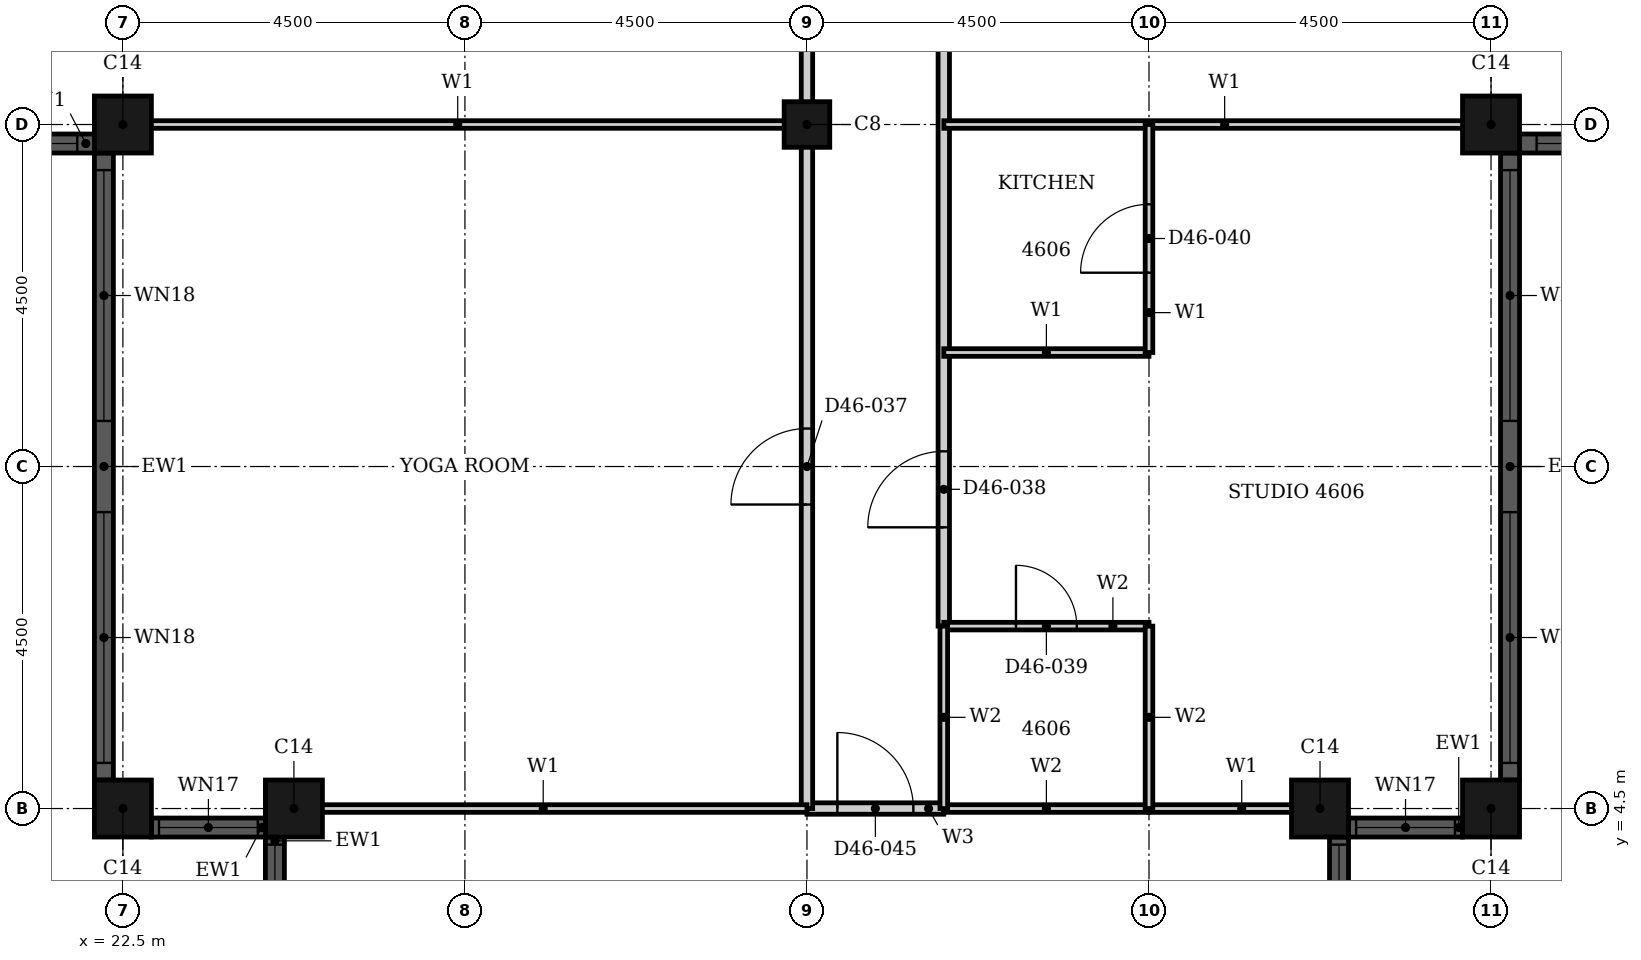
"""IFC4 building model, lengths in metres.
Left out: names, types, materials, properties, quantities, classifications, styles, units other than length and angle.
Written with IfcOpenShell. Run it as: python <this file> out.ifc"""

import sys

from ifc_helpers import new_model, si_unit, direction, frame, frame_2d, origin, origin_2d, place, context, subcontext, project, spatial, rectangle, hollow_rectangle, extrude, element, fill, save


model = new_model("IFC4")
c1 = context("Model", 3, precision=1e-05, world=origin(), true_north=direction((0.0, 1.0)))
c2 = subcontext(c1, "Body", "Model", "MODEL_VIEW")
j1 = project(units=[si_unit("LENGTHUNIT", "METRE"), si_unit("PLANEANGLEUNIT", "RADIAN")], contexts=[c1])
p1 = place(None, origin())
s1 = spatial("IfcSite", under=j1, at=p1, CompositionType="ELEMENT")
p2 = place(p1, origin())
s2 = spatial("IfcBuilding", under=s1, at=p2, CompositionType="ELEMENT")
p3 = place(p2, frame((0.0, 0.0, 183.9)))
s3 = spatial("IfcBuildingStorey", under=s2, at=p3, CompositionType="ELEMENT", Elevation=183.9)
for number, where, z_axis, x_axis in (
    (1, (22.5, 4.5, 0.0), (0.0, 0.0, 1.0), (1.0, 0.0, 0.0)),
    (2, (24.75, 4.5, 0.0), (0.0, 0.0, 1.0), (1.0, 0.0, 0.0)),
    (3, (38.25, 4.5, 0.0), (0.0, 0.0, 1.0), (1.0, 0.0, 0.0)),
    (4, (40.5, 4.5, 0.0), (0.0, 0.0, 1.0), (1.0, 0.0, 0.0)),
    (5, (40.5, 13.5, 0.0), (0.0, 0.0, 1.0), (1.0, 0.0, 0.0)),
    (6, (22.5, 13.5, 0.0), (0.0, 0.0, 1.0), (1.0, 0.0, 0.0)),
):
    element("IfcColumn", number, at=place(p3, frame(where, z_axis=z_axis, x_axis=x_axis)), inside=s3, PredefinedType="COLUMN", context=c2, shape_type="SweptSolid", body=[
        extrude(hollow_rectangle(XDim=0.75, YDim=0.75, WallThickness=0.024, at=origin_2d()), origin(), (0.0, 0.0, 1.0), 3.7),
    ])
p4 = place(p3, frame((31.5, 13.5, 0.0), z_axis=(0.0, 0.0, 1.0), x_axis=(1.0, 0.0, 0.0)))
e7 = element("IfcColumn", 7, at=p4, inside=s3, PredefinedType="COLUMN", context=c2, shape_type="SweptSolid", body=[
    extrude(hollow_rectangle(XDim=0.6, YDim=0.6, WallThickness=0.02, at=origin_2d()), origin(), (0.0, 0.0, 1.0), 3.7),
])
p5 = place(p3, frame((22.875, 4.25, 0.0), z_axis=(0.0, 0.0, 1.0), x_axis=(1.0, 0.0, 0.0)))
e8 = element("IfcWall", 8, at=p5, inside=s3, PredefinedType="SOLIDWALL", context=c2, shape_type="SweptSolid", body=[
    extrude(rectangle(XDim=1.5, YDim=0.25, at=frame_2d((0.75, 0.0))), origin(), (0.0, 0.0, 1.0), 3.7),
])
p6 = place(p5, frame((0.1, 0.0, 0.9)))
e9 = element("IfcOpeningElement", 9, at=p6, cuts=e8, PredefinedType="OPENING", context=c2, shape_type="SweptSolid", body=[
    extrude(rectangle(XDim=1.3, YDim=1.95, at=frame_2d((0.65, 0.975))), frame((0.0, 0.135, 0.0), z_axis=(0.0, -1.0, 0.0), x_axis=(1.0, 0.0, 0.0)), (0.0, 0.0, 1.0), 0.27),
])
p7 = place(p3, frame((24.5, 4.125, 0.0), z_axis=(0.0, 0.0, 1.0), x_axis=(0.0, -1.0, 0.0)))
e10 = element("IfcWall", 10, at=p7, inside=s3, PredefinedType="SOLIDWALL", context=c2, shape_type="SweptSolid", body=[
    extrude(rectangle(XDim=1.5, YDim=0.25, at=frame_2d((0.75, 0.0))), origin(), (0.0, 0.0, 1.0), 3.7),
])
p8 = place(p7, frame((0.1, 0.0, 0.9)))
e11 = element("IfcOpeningElement", 11, at=p8, cuts=e10, PredefinedType="OPENING", context=c2, shape_type="SweptSolid", body=[
    extrude(rectangle(XDim=1.3, YDim=1.95, at=frame_2d((0.65, 0.975))), frame((0.0, 0.135, 0.0), z_axis=(0.0, -1.0, 0.0), x_axis=(1.0, 0.0, 0.0)), (0.0, 0.0, 1.0), 0.27),
])
p9 = place(p3, frame((38.5, 2.625, 0.0), z_axis=(0.0, 0.0, 1.0), x_axis=(0.0, 1.0, 0.0)))
e12 = element("IfcWall", 12, at=p9, inside=s3, PredefinedType="SOLIDWALL", context=c2, shape_type="SweptSolid", body=[
    extrude(rectangle(XDim=1.5, YDim=0.25, at=frame_2d((0.75, 0.0))), origin(), (0.0, 0.0, 1.0), 3.7),
])
p10 = place(p9, frame((0.1, 0.0, 0.9)))
e13 = element("IfcOpeningElement", 13, at=p10, cuts=e12, PredefinedType="OPENING", context=c2, shape_type="SweptSolid", body=[
    extrude(rectangle(XDim=1.3, YDim=1.95, at=frame_2d((0.65, 0.975))), frame((0.0, 0.135, 0.0), z_axis=(0.0, -1.0, 0.0), x_axis=(1.0, 0.0, 0.0)), (0.0, 0.0, 1.0), 0.27),
])
p11 = place(p3, frame((38.625, 4.25, 0.0), z_axis=(0.0, 0.0, 1.0), x_axis=(1.0, 0.0, 0.0)))
e14 = element("IfcWall", 14, at=p11, inside=s3, PredefinedType="SOLIDWALL", context=c2, shape_type="SweptSolid", body=[
    extrude(rectangle(XDim=1.5, YDim=0.25, at=frame_2d((0.75, 0.0))), origin(), (0.0, 0.0, 1.0), 3.7),
])
p12 = place(p11, frame((0.1, 0.0, 0.9)))
e15 = element("IfcOpeningElement", 15, at=p12, cuts=e14, PredefinedType="OPENING", context=c2, shape_type="SweptSolid", body=[
    extrude(rectangle(XDim=1.3, YDim=1.95, at=frame_2d((0.65, 0.975))), frame((0.0, 0.135, 0.0), z_axis=(0.0, -1.0, 0.0), x_axis=(1.0, 0.0, 0.0)), (0.0, 0.0, 1.0), 0.27),
])
p13 = place(p3, frame((40.75, 4.875, 0.0), z_axis=(0.0, 0.0, 1.0), x_axis=(0.0, 1.0, 0.0)))
e16 = element("IfcWall", 16, at=p13, inside=s3, PredefinedType="SOLIDWALL", context=c2, shape_type="SweptSolid", body=[
    extrude(rectangle(XDim=8.25, YDim=0.25, at=frame_2d((4.125, 0.0))), origin(), (0.0, 0.0, 1.0), 3.7),
])
p14 = place(p13, frame((0.225, 0.0, 0.45)))
e17 = element("IfcOpeningElement", 17, at=p14, cuts=e16, PredefinedType="OPENING", context=c2, shape_type="SweptSolid", body=[
    extrude(rectangle(XDim=3.3, YDim=2.4, at=frame_2d((1.65, 1.2))), frame((0.0, 0.135, 0.0), z_axis=(0.0, -1.0, 0.0), x_axis=(1.0, 0.0, 0.0)), (0.0, 0.0, 1.0), 0.27),
])
p15 = place(p13, frame((4.725, 0.0, 0.45)))
e18 = element("IfcOpeningElement", 18, at=p15, cuts=e16, PredefinedType="OPENING", context=c2, shape_type="SweptSolid", body=[
    extrude(rectangle(XDim=3.3, YDim=2.4, at=frame_2d((1.65, 1.2))), frame((0.0, 0.135, 0.0), z_axis=(0.0, -1.0, 0.0), x_axis=(1.0, 0.0, 0.0)), (0.0, 0.0, 1.0), 0.27),
])
p16 = place(p3, frame((40.875, 13.25, 0.0), z_axis=(0.0, 0.0, 1.0), x_axis=(1.0, 0.0, 0.0)))
e19 = element("IfcWall", 19, at=p16, inside=s3, PredefinedType="SOLIDWALL", context=c2, shape_type="SweptSolid", body=[
    extrude(rectangle(XDim=3.75, YDim=0.25, at=frame_2d((1.875, 0.0))), origin(), (0.0, 0.0, 1.0), 3.7),
])
p17 = place(p16, frame((0.225, 0.0, 0.45)))
e20 = element("IfcOpeningElement", 20, at=p17, cuts=e19, PredefinedType="OPENING", context=c2, shape_type="SweptSolid", body=[
    extrude(rectangle(XDim=3.3, YDim=2.4, at=frame_2d((1.65, 1.2))), frame((0.0, 0.135, 0.0), z_axis=(0.0, -1.0, 0.0), x_axis=(1.0, 0.0, 0.0)), (0.0, 0.0, 1.0), 0.27),
])
p18 = place(p3, frame((18.375, 13.25, 0.0), z_axis=(0.0, 0.0, 1.0), x_axis=(1.0, 0.0, 0.0)))
e21 = element("IfcWall", 21, at=p18, inside=s3, PredefinedType="SOLIDWALL", context=c2, shape_type="SweptSolid", body=[
    extrude(rectangle(XDim=3.75, YDim=0.25, at=frame_2d((1.875, 0.0))), origin(), (0.0, 0.0, 1.0), 3.7),
])
p19 = place(p18, frame((0.225, 0.0, 0.45)))
e22 = element("IfcOpeningElement", 22, at=p19, cuts=e21, PredefinedType="OPENING", context=c2, shape_type="SweptSolid", body=[
    extrude(rectangle(XDim=3.3, YDim=2.4, at=frame_2d((1.65, 1.2))), frame((0.0, 0.135, 0.0), z_axis=(0.0, -1.0, 0.0), x_axis=(1.0, 0.0, 0.0)), (0.0, 0.0, 1.0), 0.27),
])
p20 = place(p3, frame((22.25, 13.125, 0.0), z_axis=(0.0, 0.0, 1.0), x_axis=(0.0, -1.0, 0.0)))
e23 = element("IfcWall", 23, at=p20, inside=s3, PredefinedType="SOLIDWALL", context=c2, shape_type="SweptSolid", body=[
    extrude(rectangle(XDim=8.25, YDim=0.25, at=frame_2d((4.125, 0.0))), origin(), (0.0, 0.0, 1.0), 3.7),
])
p21 = place(p20, frame((0.225, 0.0, 0.45)))
e24 = element("IfcOpeningElement", 24, at=p21, cuts=e23, PredefinedType="OPENING", context=c2, shape_type="SweptSolid", body=[
    extrude(rectangle(XDim=3.3, YDim=2.4, at=frame_2d((1.65, 1.2))), frame((0.0, 0.135, 0.0), z_axis=(0.0, -1.0, 0.0), x_axis=(1.0, 0.0, 0.0)), (0.0, 0.0, 1.0), 0.27),
])
p22 = place(p20, frame((4.725, 0.0, 0.45)))
e25 = element("IfcOpeningElement", 25, at=p22, cuts=e23, PredefinedType="OPENING", context=c2, shape_type="SweptSolid", body=[
    extrude(rectangle(XDim=3.3, YDim=2.4, at=frame_2d((1.65, 1.2))), frame((0.0, 0.135, 0.0), z_axis=(0.0, -1.0, 0.0), x_axis=(1.0, 0.0, 0.0)), (0.0, 0.0, 1.0), 0.27),
])
p23 = place(p3, frame((31.5, 4.5, 0.0), z_axis=(0.0, 0.0, 1.0), x_axis=(1.0, 0.0, 0.0)))
e26 = element("IfcWall", 26, at=p23, inside=s3, PredefinedType="PARTITIONING", context=c2, shape_type="SweptSolid", body=[
    extrude(rectangle(XDim=1.8, YDim=0.15, at=frame_2d((0.9, 0.0))), origin(), (0.0, 0.0, 1.0), 3.3),
])
p24 = place(p23, frame((0.4, 0.0, 0.0)))
e27 = element("IfcOpeningElement", 27, at=p24, cuts=e26, PredefinedType="OPENING", context=c2, shape_type="SweptSolid", body=[
    extrude(rectangle(XDim=1.0, YDim=2.1, at=frame_2d((0.5, 1.05))), frame((0.0, 0.085, 0.0), z_axis=(0.0, -1.0, 0.0), x_axis=(1.0, 0.0, 0.0)), (0.0, 0.0, 1.0), 0.17),
])
p25 = place(p3, frame((31.5, 4.5, 0.0), z_axis=(0.0, 0.0, 1.0), x_axis=(0.0, 1.0, 0.0)))
e28 = element("IfcWall", 28, at=p25, inside=s3, PredefinedType="PARTITIONING", context=c2, shape_type="SweptSolid", body=[
    extrude(rectangle(XDim=16.2, YDim=0.15, at=frame_2d((8.1, 0.0))), origin(), (0.0, 0.0, 1.0), 2.58),
])
p26 = place(p25, frame((4.0, 0.0, 0.0)))
e29 = element("IfcOpeningElement", 29, at=p26, cuts=e28, PredefinedType="OPENING", context=c2, shape_type="SweptSolid", body=[
    extrude(rectangle(XDim=1.0, YDim=2.1, at=frame_2d((0.5, 1.05))), frame((0.0, 0.085, 0.0), z_axis=(0.0, -1.0, 0.0), x_axis=(1.0, 0.0, 0.0)), (0.0, 0.0, 1.0), 0.17),
])
p27 = place(p3, frame((33.3, 6.9, 0.0), z_axis=(0.0, 0.0, 1.0), x_axis=(0.0, 1.0, 0.0)))
e30 = element("IfcWall", 30, at=p27, inside=s3, PredefinedType="PARTITIONING", context=c2, shape_type="SweptSolid", body=[
    extrude(rectangle(XDim=13.799, YDim=0.15, at=frame_2d((6.899, 0.0))), origin(), (0.0, 0.0, 1.0), 3.3),
])
p28 = place(p27, frame((1.3, 0.0, 0.0)))
e31 = element("IfcOpeningElement", 31, at=p28, cuts=e30, PredefinedType="OPENING", context=c2, shape_type="SweptSolid", body=[
    extrude(rectangle(XDim=1.0, YDim=2.2, at=frame_2d((0.5, 1.1))), frame((0.0, 0.085, 0.0), z_axis=(0.0, -1.0, 0.0), x_axis=(1.0, 0.0, 0.0)), (0.0, 0.0, 1.0), 0.17),
])
p29 = place(p3, frame((33.3, 10.5, 0.0), z_axis=(0.0, 0.0, 1.0), x_axis=(1.0, 0.0, 0.0)))
e32 = element("IfcWall", 32, at=p29, inside=s3, PredefinedType="PARTITIONING", context=c2, shape_type="SweptSolid", body=[
    extrude(rectangle(XDim=2.7, YDim=0.1, at=frame_2d((1.35, 0.0))), origin(), (0.0, 0.0, 1.0), 3.3),
])
p30 = place(p3, frame((33.301, 13.5, 0.0), z_axis=(0.0, 0.0, 1.0), x_axis=(1.0, 0.0, 0.0)))
e33 = element("IfcWall", 33, at=p30, inside=s3, PredefinedType="PARTITIONING", context=c2, shape_type="SweptSolid", body=[
    extrude(rectangle(XDim=7.389, YDim=0.1, at=frame_2d((3.694, 0.0))), origin(), (0.0, 0.0, 1.0), 2.38),
])
p31 = place(p3, frame((22.31, 13.5, 0.0), z_axis=(0.0, 0.0, 1.0), x_axis=(1.0, 0.0, 0.0)))
e34 = element("IfcWall", 34, at=p31, inside=s3, PredefinedType="PARTITIONING", context=c2, shape_type="SweptSolid", body=[
    extrude(rectangle(XDim=9.19, YDim=0.1, at=frame_2d((4.595, 0.0))), origin(), (0.0, 0.0, 1.0), 2.38),
])
p32 = place(p3, frame((36.0, 4.5, 0.0), z_axis=(0.0, 0.0, 1.0), x_axis=(1.0, 0.0, 0.0)))
e35 = element("IfcWall", 35, at=p32, inside=s3, PredefinedType="PARTITIONING", context=c2, shape_type="SweptSolid", body=[
    extrude(rectangle(XDim=2.44, YDim=0.1, at=frame_2d((1.22, 0.0))), origin(), (0.0, 0.0, 1.0), 3.3),
])
p33 = place(p3, frame((24.56, 4.5, 0.0), z_axis=(0.0, 0.0, 1.0), x_axis=(1.0, 0.0, 0.0)))
e36 = element("IfcWall", 36, at=p33, inside=s3, PredefinedType="PARTITIONING", context=c2, shape_type="SweptSolid", body=[
    extrude(rectangle(XDim=6.94, YDim=0.1, at=frame_2d((3.47, 0.0))), origin(), (0.0, 0.0, 1.0), 3.3),
])
p34 = place(p3, frame((36.0, 10.5, 0.0), z_axis=(0.0, 0.0, 1.0), x_axis=(0.0, 1.0, 0.0)))
e37 = element("IfcWall", 37, at=p34, inside=s3, PredefinedType="PARTITIONING", context=c2, shape_type="SweptSolid", body=[
    extrude(rectangle(XDim=3.0, YDim=0.1, at=frame_2d((1.5, 0.0))), origin(), (0.0, 0.0, 1.0), 2.58),
])
p35 = place(p34, frame((1.05, 0.0, 0.0)))
e38 = element("IfcOpeningElement", 38, at=p35, cuts=e37, PredefinedType="OPENING", context=c2, shape_type="SweptSolid", body=[
    extrude(rectangle(XDim=0.9, YDim=2.1, at=frame_2d((0.45, 1.05))), frame((0.0, 0.06, 0.0), z_axis=(0.0, -1.0, 0.0), x_axis=(1.0, 0.0, 0.0)), (0.0, 0.0, 1.0), 0.12),
])
p36 = place(p3, frame((33.3, 4.5, 0.0), z_axis=(0.0, 0.0, 1.0), x_axis=(1.0, 0.0, 0.0)))
e39 = element("IfcWall", 39, at=p36, inside=s3, PredefinedType="PARTITIONING", context=c2, shape_type="SweptSolid", body=[
    extrude(rectangle(XDim=2.7, YDim=0.1, at=frame_2d((1.35, 0.0))), origin(), (0.0, 0.0, 1.0), 3.3),
])
p37 = place(p3, frame((33.3, 6.9, 0.0), z_axis=(0.0, 0.0, 1.0), x_axis=(1.0, 0.0, 0.0)))
e40 = element("IfcWall", 40, at=p37, inside=s3, PredefinedType="PARTITIONING", context=c2, shape_type="SweptSolid", body=[
    extrude(rectangle(XDim=2.7, YDim=0.1, at=frame_2d((1.35, 0.0))), origin(), (0.0, 0.0, 1.0), 3.3),
])
p38 = place(p37, frame((0.95, 0.0, 0.0)))
e41 = element("IfcOpeningElement", 41, at=p38, cuts=e40, PredefinedType="OPENING", context=c2, shape_type="SweptSolid", body=[
    extrude(rectangle(XDim=0.8, YDim=2.1, at=frame_2d((0.4, 1.05))), frame((0.0, 0.06, 0.0), z_axis=(0.0, -1.0, 0.0), x_axis=(1.0, 0.0, 0.0)), (0.0, 0.0, 1.0), 0.12),
])
p39 = place(p3, frame((33.3, 4.5, 0.0), z_axis=(0.0, 0.0, 1.0), x_axis=(0.0, 1.0, 0.0)))
e42 = element("IfcWall", 42, at=p39, inside=s3, PredefinedType="PARTITIONING", context=c2, shape_type="SweptSolid", body=[
    extrude(rectangle(XDim=2.4, YDim=0.1, at=frame_2d((1.2, 0.0))), origin(), (0.0, 0.0, 1.0), 3.3),
])
p40 = place(p3, frame((36.0, 4.5, 0.0), z_axis=(0.0, 0.0, 1.0), x_axis=(0.0, 1.0, 0.0)))
e43 = element("IfcWall", 43, at=p40, inside=s3, PredefinedType="PARTITIONING", context=c2, shape_type="SweptSolid", body=[
    extrude(rectangle(XDim=2.4, YDim=0.1, at=frame_2d((1.2, 0.0))), origin(), (0.0, 0.0, 1.0), 2.58),
])
p41 = place(p6, origin())
e44 = element("IfcWindow", 44, at=p41, inside=s3, PartitioningType="SINGLE_PANEL", PredefinedType="WINDOW", context=c2, shape_type="SweptSolid", body=[
    extrude(rectangle(XDim=1.3, YDim=1.95, at=frame_2d((0.65, 0.975))), frame((0.0, 0.03, 0.0), z_axis=(0.0, -1.0, 0.0), x_axis=(1.0, 0.0, 0.0)), (0.0, 0.0, 1.0), 0.06),
])
fill(e9, e44)
p42 = place(p8, origin())
e45 = element("IfcWindow", 45, at=p42, inside=s3, PartitioningType="SINGLE_PANEL", PredefinedType="WINDOW", context=c2, shape_type="SweptSolid", body=[
    extrude(rectangle(XDim=1.3, YDim=1.95, at=frame_2d((0.65, 0.975))), frame((0.0, 0.03, 0.0), z_axis=(0.0, -1.0, 0.0), x_axis=(1.0, 0.0, 0.0)), (0.0, 0.0, 1.0), 0.06),
])
fill(e11, e45)
p43 = place(p10, origin())
e46 = element("IfcWindow", 46, at=p43, inside=s3, PartitioningType="SINGLE_PANEL", PredefinedType="WINDOW", context=c2, shape_type="SweptSolid", body=[
    extrude(rectangle(XDim=1.3, YDim=1.95, at=frame_2d((0.65, 0.975))), frame((0.0, 0.03, 0.0), z_axis=(0.0, -1.0, 0.0), x_axis=(1.0, 0.0, 0.0)), (0.0, 0.0, 1.0), 0.06),
])
fill(e13, e46)
p44 = place(p12, origin())
e47 = element("IfcWindow", 47, at=p44, inside=s3, PartitioningType="SINGLE_PANEL", PredefinedType="WINDOW", context=c2, shape_type="SweptSolid", body=[
    extrude(rectangle(XDim=1.3, YDim=1.95, at=frame_2d((0.65, 0.975))), frame((0.0, 0.03, 0.0), z_axis=(0.0, -1.0, 0.0), x_axis=(1.0, 0.0, 0.0)), (0.0, 0.0, 1.0), 0.06),
])
fill(e15, e47)
p45 = place(p14, origin())
e48 = element("IfcWindow", 48, at=p45, inside=s3, PartitioningType="SINGLE_PANEL", PredefinedType="WINDOW", context=c2, shape_type="SweptSolid", body=[
    extrude(rectangle(XDim=3.3, YDim=2.4, at=frame_2d((1.65, 1.2))), frame((0.0, 0.03, 0.0), z_axis=(0.0, -1.0, 0.0), x_axis=(1.0, 0.0, 0.0)), (0.0, 0.0, 1.0), 0.06),
])
fill(e17, e48)
p46 = place(p15, origin())
e49 = element("IfcWindow", 49, at=p46, inside=s3, PartitioningType="SINGLE_PANEL", PredefinedType="WINDOW", context=c2, shape_type="SweptSolid", body=[
    extrude(rectangle(XDim=3.3, YDim=2.4, at=frame_2d((1.65, 1.2))), frame((0.0, 0.03, 0.0), z_axis=(0.0, -1.0, 0.0), x_axis=(1.0, 0.0, 0.0)), (0.0, 0.0, 1.0), 0.06),
])
fill(e18, e49)
p47 = place(p17, origin())
e50 = element("IfcWindow", 50, at=p47, inside=s3, PartitioningType="SINGLE_PANEL", PredefinedType="WINDOW", context=c2, shape_type="SweptSolid", body=[
    extrude(rectangle(XDim=3.3, YDim=2.4, at=frame_2d((1.65, 1.2))), frame((0.0, 0.03, 0.0), z_axis=(0.0, -1.0, 0.0), x_axis=(1.0, 0.0, 0.0)), (0.0, 0.0, 1.0), 0.06),
])
fill(e20, e50)
p48 = place(p19, origin())
e51 = element("IfcWindow", 51, at=p48, inside=s3, PartitioningType="SINGLE_PANEL", PredefinedType="WINDOW", context=c2, shape_type="SweptSolid", body=[
    extrude(rectangle(XDim=3.3, YDim=2.4, at=frame_2d((1.65, 1.2))), frame((0.0, 0.03, 0.0), z_axis=(0.0, -1.0, 0.0), x_axis=(1.0, 0.0, 0.0)), (0.0, 0.0, 1.0), 0.06),
])
fill(e22, e51)
p49 = place(p21, origin())
e52 = element("IfcWindow", 52, at=p49, inside=s3, PartitioningType="SINGLE_PANEL", PredefinedType="WINDOW", context=c2, shape_type="SweptSolid", body=[
    extrude(rectangle(XDim=3.3, YDim=2.4, at=frame_2d((1.65, 1.2))), frame((0.0, 0.03, 0.0), z_axis=(0.0, -1.0, 0.0), x_axis=(1.0, 0.0, 0.0)), (0.0, 0.0, 1.0), 0.06),
])
fill(e24, e52)
p50 = place(p22, origin())
e53 = element("IfcWindow", 53, at=p50, inside=s3, PartitioningType="SINGLE_PANEL", PredefinedType="WINDOW", context=c2, shape_type="SweptSolid", body=[
    extrude(rectangle(XDim=3.3, YDim=2.4, at=frame_2d((1.65, 1.2))), frame((0.0, 0.03, 0.0), z_axis=(0.0, -1.0, 0.0), x_axis=(1.0, 0.0, 0.0)), (0.0, 0.0, 1.0), 0.06),
])
fill(e25, e53)
p51 = place(p26, origin())
e54 = element("IfcDoor", 54, at=p51, inside=s3, OperationType="SINGLE_SWING_RIGHT", PredefinedType="DOOR", context=c2, shape_type="SweptSolid", body=[
    extrude(rectangle(XDim=1.0, YDim=2.1, at=frame_2d((0.5, 1.05))), frame((0.0, 0.025, 0.0), z_axis=(0.0, -1.0, 0.0), x_axis=(1.0, 0.0, 0.0)), (0.0, 0.0, 1.0), 0.05),
])
fill(e29, e54)
p52 = place(p28, origin())
e55 = element("IfcDoor", 55, at=p52, inside=s3, OperationType="SINGLE_SWING_LEFT", PredefinedType="DOOR", context=c2, shape_type="SweptSolid", body=[
    extrude(rectangle(XDim=1.0, YDim=2.2, at=frame_2d((0.5, 1.1))), frame((0.0, 0.025, 0.0), z_axis=(0.0, -1.0, 0.0), x_axis=(1.0, 0.0, 0.0)), (0.0, 0.0, 1.0), 0.05),
])
fill(e31, e55)
p53 = place(p38, origin())
e56 = element("IfcDoor", 56, at=p53, inside=s3, OperationType="SINGLE_SWING_RIGHT", PredefinedType="DOOR", context=c2, shape_type="SweptSolid", body=[
    extrude(rectangle(XDim=0.8, YDim=2.1, at=frame_2d((0.4, 1.05))), frame((0.0, 0.025, 0.0), z_axis=(0.0, -1.0, 0.0), x_axis=(1.0, 0.0, 0.0)), (0.0, 0.0, 1.0), 0.05),
])
fill(e41, e56)
p54 = place(p35, origin())
e57 = element("IfcDoor", 57, at=p54, inside=s3, OperationType="SINGLE_SWING_RIGHT", PredefinedType="DOOR", context=c2, shape_type="SweptSolid", body=[
    extrude(rectangle(XDim=0.9, YDim=2.1, at=frame_2d((0.45, 1.05))), frame((0.0, 0.025, 0.0), z_axis=(0.0, -1.0, 0.0), x_axis=(1.0, 0.0, 0.0)), (0.0, 0.0, 1.0), 0.05),
])
fill(e38, e57)
p55 = place(p24, origin())
e58 = element("IfcDoor", 58, at=p55, inside=s3, OperationType="SINGLE_SWING_LEFT", PredefinedType="DOOR", context=c2, shape_type="SweptSolid", body=[
    extrude(rectangle(XDim=1.0, YDim=2.1, at=frame_2d((0.5, 1.05))), frame((0.0, 0.025, 0.0), z_axis=(0.0, -1.0, 0.0), x_axis=(1.0, 0.0, 0.0)), (0.0, 0.0, 1.0), 0.05),
])
fill(e27, e58)
save(model, sys.argv[1])
